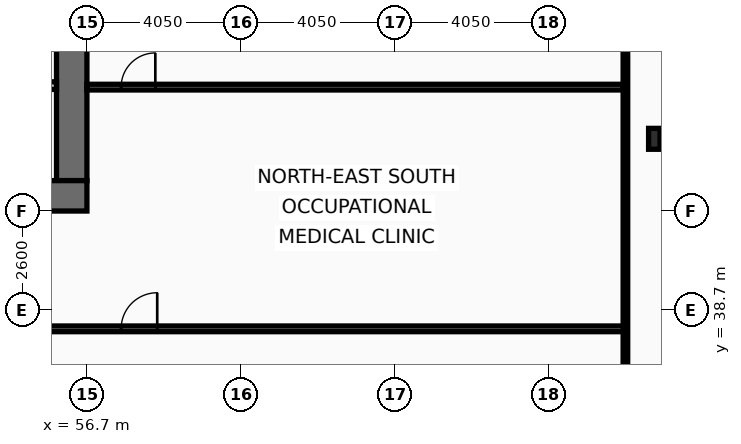
"""IFC4 building model, lengths in metres.
Left out: names, types, materials, properties, quantities, classifications, styles, units other than length and angle.
Written with IfcOpenShell. Run it as: python <this file> out.ifc"""

import sys

from ifc_helpers import new_model, si_unit, direction, frame, frame_2d, origin, origin_2d, place, context, subcontext, project, spatial, rectangle, i_section, extrude, element, fill, save


model = new_model("IFC4")
c1 = context("Model", 3, precision=1e-05, world=origin(), true_north=direction((0.0, 1.0)))
c2 = subcontext(c1, "Body", "Model", "MODEL_VIEW")
j1 = project(units=[si_unit("LENGTHUNIT", "METRE"), si_unit("PLANEANGLEUNIT", "RADIAN")], contexts=[c1])
p1 = place(None, origin())
s1 = spatial("IfcSite", under=j1, at=p1, CompositionType="ELEMENT")
p2 = place(p1, origin())
s2 = spatial("IfcBuilding", under=s1, at=p2, CompositionType="ELEMENT")
p3 = place(p2, frame((0.0, 0.0, 41.8)))
s3 = spatial("IfcBuildingStorey", under=s2, at=p3, CompositionType="ELEMENT", Elevation=41.8)
p4 = place(p3, frame((56.3, 52.9, 0.0), z_axis=(0.0, 0.0, 1.0), x_axis=(0.0, -1.0, 0.0)))
e1 = element("IfcWall", 1, at=p4, inside=s3, PredefinedType="SHEAR", context=c2, shape_type="SweptSolid", body=[
    extrude(rectangle(XDim=10.8, YDim=0.8, at=frame_2d((5.4, 0.0))), origin(), (0.0, 0.0, 1.0), 3.82),
])
p5 = place(p3, frame((56.7, 41.7, 0.0), z_axis=(0.0, 0.0, 1.0), x_axis=(-1.0, 0.0, 0.0)))
e2 = element("IfcWall", 2, at=p5, inside=s3, PredefinedType="SHEAR", context=c2, shape_type="SweptSolid", body=[
    extrude(rectangle(XDim=2.45, YDim=0.8, at=frame_2d((1.225, 0.0))), origin(), (0.0, 0.0, 1.0), 3.82),
])
p6 = place(p3, frame((71.63, 43.2, 0.0), z_axis=(0.0, 0.0, 1.0), x_axis=(1.0, 0.0, 0.0)))
e3 = element("IfcColumn", 3, at=p6, inside=s3, PredefinedType="COLUMN", context=c2, shape_type="SweptSolid", body=[
    extrude(i_section(OverallWidth=0.3, OverallDepth=0.55, WebThickness=0.015, FlangeThickness=0.029, at=origin_2d()), origin(), (0.0, 0.0, 1.0), 4.0),
])
p7 = place(p3, frame((51.9, 44.6, 0.0), z_axis=(0.0, 0.0, 1.0), x_axis=(1.0, 0.0, 0.0)))
e4 = element("IfcWall", 4, at=p7, inside=s3, PredefinedType="PARTITIONING", context=c2, shape_type="SweptSolid", body=[
    extrude(rectangle(XDim=4.0, YDim=0.2, at=frame_2d((2.0, 0.0))), origin(), (0.0, 0.0, 1.0), 3.82),
])
p8 = place(p7, frame((1.15, 0.0, 0.0)))
e5 = element("IfcOpeningElement", 5, at=p8, cuts=e4, PredefinedType="OPENING", context=c2, shape_type="SweptSolid", body=[
    extrude(rectangle(XDim=1.05, YDim=2.15, at=frame_2d((0.525, 1.075))), frame((0.0, 0.11, 0.0), z_axis=(0.0, -1.0, 0.0), x_axis=(1.0, 0.0, 0.0)), (0.0, 0.0, 1.0), 0.22),
])
p9 = place(p3, frame((54.35, 38.2, 0.0), z_axis=(0.0, 0.0, 1.0), x_axis=(1.0, 0.0, 0.0)))
e6 = element("IfcWall", 6, at=p9, inside=s3, PredefinedType="PARTITIONING", context=c2, shape_type="SweptSolid", body=[
    extrude(rectangle(XDim=16.52, YDim=0.15, at=frame_2d((8.26, 0.0))), origin(), (0.0, 0.0, 1.0), 3.01),
])
p10 = place(p9, frame((3.25, 0.0, 0.0)))
e7 = element("IfcOpeningElement", 7, at=p10, cuts=e6, PredefinedType="OPENING", context=c2, shape_type="SweptSolid", body=[
    extrude(rectangle(XDim=0.95, YDim=2.05, at=frame_2d((0.475, 1.025))), frame((0.0, 0.085, 0.0), z_axis=(0.0, -1.0, 0.0), x_axis=(1.0, 0.0, 0.0)), (0.0, 0.0, 1.0), 0.17),
])
p11 = place(p3, frame((56.7, 44.56, 0.0), z_axis=(0.0, 0.0, 1.0), x_axis=(1.0, 0.0, 0.0)))
e8 = element("IfcWall", 8, at=p11, inside=s3, PredefinedType="PARTITIONING", context=c2, shape_type="SweptSolid", body=[
    extrude(rectangle(XDim=14.105, YDim=0.15, at=frame_2d((7.052, 0.0))), origin(), (0.0, 0.0, 1.0), 3.16),
])
p12 = place(p11, frame((0.9, 0.0, 0.0)))
e9 = element("IfcOpeningElement", 9, at=p12, cuts=e8, PredefinedType="OPENING", context=c2, shape_type="SweptSolid", body=[
    extrude(rectangle(XDim=0.9, YDim=2.05, at=frame_2d((0.45, 1.025))), frame((0.0, 0.085, 0.0), z_axis=(0.0, -1.0, 0.0), x_axis=(1.0, 0.0, 0.0)), (0.0, 0.0, 1.0), 0.17),
])
p13 = place(p3, frame((70.87, 10.665, 0.0), z_axis=(0.0, 0.0, 1.0), x_axis=(0.0, 1.0, 0.0)))
e10 = element("IfcWall", 10, at=p13, inside=s3, PredefinedType="PARTITIONING", context=c2, shape_type="SweptSolid", body=[
    extrude(rectangle(XDim=42.11, YDim=0.12, at=frame_2d((21.055, 0.0))), origin(), (0.0, 0.0, 1.0), 3.01),
])
p14 = place(p10, origin())
e11 = element("IfcDoor", 11, at=p14, inside=s3, OperationType="SINGLE_SWING_RIGHT", PredefinedType="DOOR", context=c2, shape_type="SweptSolid", body=[
    extrude(rectangle(XDim=0.95, YDim=2.05, at=frame_2d((0.475, 1.025))), frame((0.0, 0.025, 0.0), z_axis=(0.0, -1.0, 0.0), x_axis=(1.0, 0.0, 0.0)), (0.0, 0.0, 1.0), 0.05),
])
fill(e7, e11)
p15 = place(p12, origin())
e12 = element("IfcDoor", 12, at=p15, inside=s3, OperationType="SINGLE_SWING_RIGHT", PredefinedType="DOOR", context=c2, shape_type="SweptSolid", body=[
    extrude(rectangle(XDim=0.9, YDim=2.05, at=frame_2d((0.45, 1.025))), frame((0.0, 0.025, 0.0), z_axis=(0.0, -1.0, 0.0), x_axis=(1.0, 0.0, 0.0)), (0.0, 0.0, 1.0), 0.05),
])
fill(e9, e12)
save(model, sys.argv[1])
